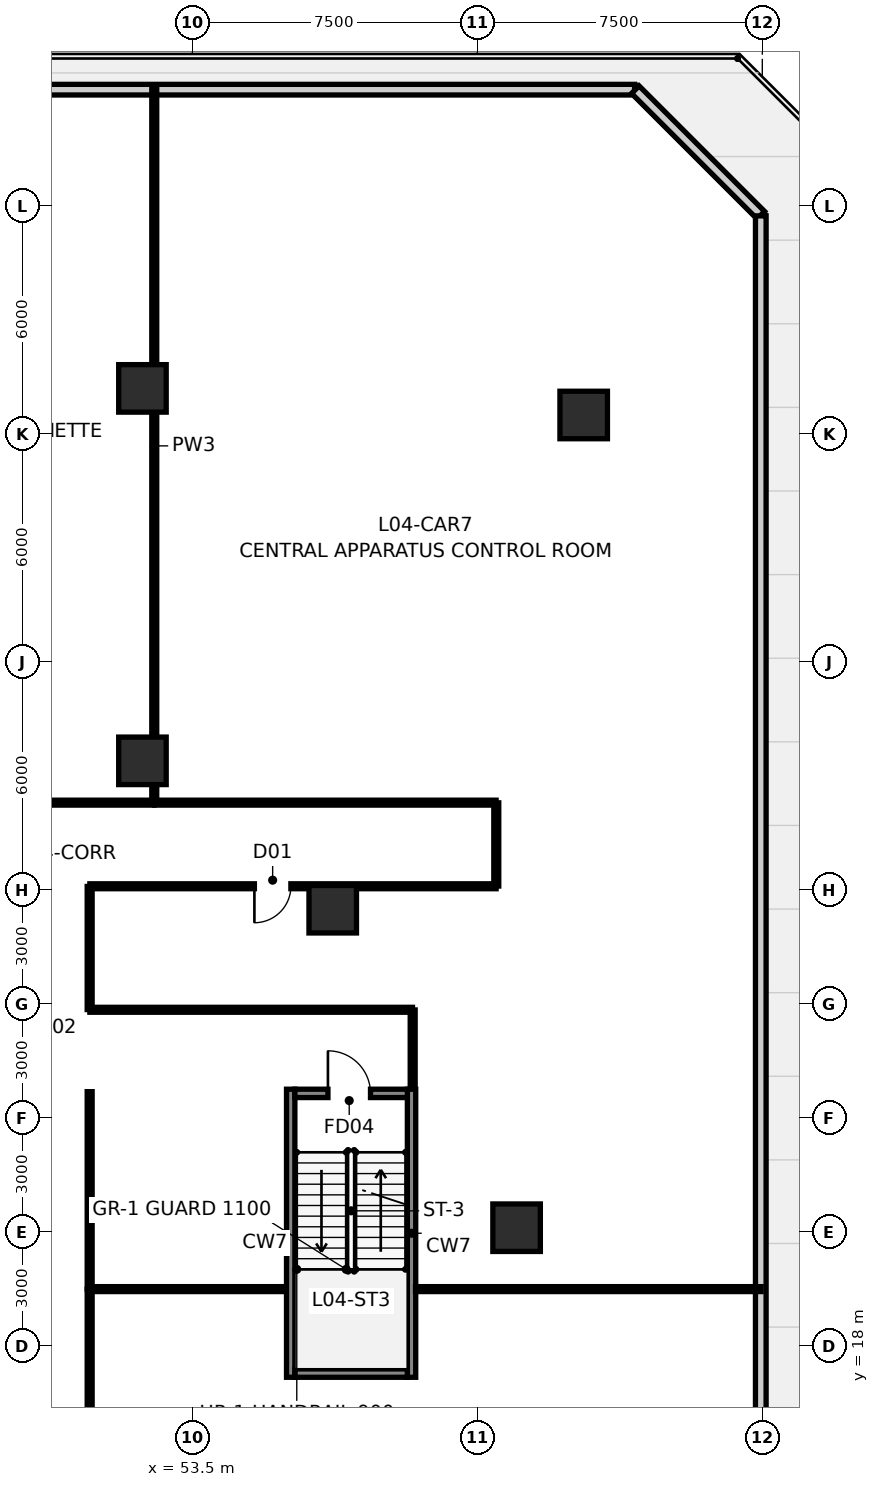
"""IFC4 building model, lengths in metres.
Left out: names, types, materials, properties, quantities, classifications, styles, units other than length and angle.
Written with IfcOpenShell. Run it as: python <this file> out.ifc"""

import sys

from ifc_helpers import new_model, si_unit, direction, frame, frame_2d, origin, origin_2d, place, context, subcontext, project, spatial, rectangle, hollow_rectangle, extrude, source, transform, mapped, element, fill, save


model = new_model("IFC4")
c1 = context("Model", 3, precision=1e-05, world=origin(), true_north=direction((0.0, 1.0)))
c2 = subcontext(c1, "Body", "Model", "MODEL_VIEW")
j1 = project(units=[si_unit("LENGTHUNIT", "METRE"), si_unit("PLANEANGLEUNIT", "RADIAN")], contexts=[c1])
p1 = place(None, origin())
s1 = spatial("IfcSite", under=j1, at=p1, CompositionType="ELEMENT")
p2 = place(p1, origin())
s2 = spatial("IfcBuilding", under=s1, at=p2, CompositionType="ELEMENT")
p3 = place(p2, frame((0.0, 0.0, 18.9)))
s3 = spatial("IfcBuildingStorey", under=s2, at=p3, CompositionType="ELEMENT", Elevation=18.9)
for number, where, z_axis, x_axis in (
    (1, (56.09, 17.18, 0.0), (0.0, 0.0, 1.0), (0.0, 1.0, 0.0)),
    (2, (59.27, 17.18, 0.0), (0.0, 0.0, 1.0), (0.0, 1.0, 0.0)),
):
    element("IfcWall", number, at=place(p3, frame(where, z_axis=z_axis, x_axis=x_axis)), inside=s3, PredefinedType="SHEAR", context=c2, shape_type="SweptSolid", body=[
        extrude(rectangle(XDim=7.58, YDim=0.22, at=frame_2d((3.79, 0.0))), origin(), (0.0, 0.0, 1.0), 4.2),
    ])
p4 = place(p3, frame((56.2, 17.29, 0.0), z_axis=(0.0, 0.0, 1.0), x_axis=(1.0, 0.0, 0.0)))
e3 = element("IfcWall", 3, at=p4, inside=s3, PredefinedType="SHEAR", context=c2, shape_type="SweptSolid", body=[
    extrude(rectangle(XDim=2.96, YDim=0.22, at=frame_2d((1.48, 0.0))), origin(), (0.0, 0.0, 1.0), 4.2),
])
p5 = place(p3, frame((56.2, 24.65, 0.0), z_axis=(0.0, 0.0, 1.0), x_axis=(1.0, 0.0, 0.0)))
e4 = element("IfcWall", 4, at=p5, inside=s3, PredefinedType="SHEAR", context=c2, shape_type="SweptSolid", body=[
    extrude(rectangle(XDim=2.96, YDim=0.22, at=frame_2d((1.48, 0.0))), origin(), (0.0, 0.0, 1.0), 4.2),
])
p6 = place(p5, frame((0.87, 0.0, 0.0)))
e5 = element("IfcOpeningElement", 5, at=p6, cuts=e4, PredefinedType="OPENING", context=c2, shape_type="SweptSolid", body=[
    extrude(rectangle(XDim=1.12, YDim=2.15, at=frame_2d((0.56, 1.075))), frame((0.0, 0.122, 0.0), z_axis=(0.0, -1.0, 0.0), x_axis=(1.0, 0.0, 0.0)), (0.0, 0.0, 1.0), 0.244),
])
m1 = source(origin(), c2, "Body", "SweptSolid", [
    extrude(hollow_rectangle(XDim=1.25, YDim=1.25, WallThickness=0.07, at=origin_2d()), origin(), (0.0, 0.0, 1.0), 4.201),
])
p7 = place(p3, frame((62.035, 21.115, 0.0), z_axis=(-0.010459692038, -0.021500478079, 0.999714121279), x_axis=(0.899235088746, -0.437465718849, 0.0)))
e6 = element("IfcColumn", 6, at=p7, inside=s3, PredefinedType="COLUMN", context=c2, shape_type="MappedRepresentation", body=[
    mapped(m1, transform((0.0, 0.0, 0.0), scale=1.0)),
])
m2 = source(origin(), c2, "Body", "SweptSolid", [
    extrude(hollow_rectangle(XDim=1.25, YDim=1.25, WallThickness=0.07, at=origin_2d()), origin(), (0.0, 0.0, 1.0), 4.201),
])
p8 = place(p3, frame((57.196, 29.496, 0.0), z_axis=(-0.014877190058, -0.013831137632, 0.999793663136), x_axis=(0.680889907137, -0.732385782467, 0.0)))
e7 = element("IfcColumn", 7, at=p8, inside=s3, PredefinedType="COLUMN", context=c2, shape_type="MappedRepresentation", body=[
    mapped(m2, transform((0.0, 0.0, 0.0), scale=1.0)),
])
m3 = source(origin(), c2, "Body", "SweptSolid", [
    extrude(hollow_rectangle(XDim=1.25, YDim=1.25, WallThickness=0.07, at=origin_2d()), origin(), (0.0, 0.0, 1.0), 4.2),
])
for number, where, z_axis, x_axis in (
    (8, (52.189, 33.4, 0.0), (0.0, 0.0, 1.0), (1.0, 0.0, 0.0)),
    (9, (52.189, 43.2, 0.0), (0.0, 0.0, 1.0), (1.0, 0.0, 0.0)),
    (10, (63.8, 42.5, 0.0), (0.0, 0.0, 1.0), (1.0, 0.0, 0.0)),
):
    element("IfcColumn", number, at=place(p3, frame(where, z_axis=z_axis, x_axis=x_axis)), inside=s3, PredefinedType="COLUMN", context=c2, shape_type="MappedRepresentation", body=[
        mapped(m3, transform((0.0, 0.0, 0.0), scale=1.0)),
    ])
p9 = place(p3, frame((10.861, 51.06, 0.0), z_axis=(0.0, 0.0, 1.0), x_axis=(1.0, 0.0, 0.0)))
e11 = element("IfcWall", 11, at=p9, inside=s3, PredefinedType="STANDARD", context=c2, shape_type="SweptSolid", body=[
    extrude(rectangle(XDim=54.278, YDim=0.28, at=frame_2d((27.139, 0.0))), origin(), (0.0, 0.0, 1.0), 3.75),
])
p10 = place(p3, frame((65.159, 51.06, 0.0), z_axis=(0.0, 0.0, 1.0), x_axis=(0.707106781187, -0.707106781187, 0.0)))
e12 = element("IfcWall", 12, at=p10, inside=s3, PredefinedType="STANDARD", context=c2, shape_type="SweptSolid", body=[
    extrude(rectangle(XDim=4.668, YDim=0.28, at=frame_2d((2.334, 0.0))), origin(), (0.0, 0.0, 1.0), 3.75),
])
p11 = place(p3, frame((68.46, 47.739, 0.0), z_axis=(0.0, 0.0, 1.0), x_axis=(0.0, -1.0, 0.0)))
e13 = element("IfcWall", 13, at=p11, inside=s3, PredefinedType="STANDARD", context=c2, shape_type="SweptSolid", body=[
    extrude(rectangle(XDim=41.678, YDim=0.28, at=frame_2d((20.839, 0.0))), origin(), (0.0, 0.0, 1.0), 3.75),
])
p12 = place(p3, frame((52.5, 32.305, 0.0), z_axis=(0.0, 0.0, 1.0), x_axis=(0.0, 1.0, 0.0)))
e14 = element("IfcWall", 14, at=p12, inside=s3, PredefinedType="PARTITIONING", context=c2, shape_type="SweptSolid", body=[
    extrude(rectangle(XDim=18.765, YDim=0.13, at=frame_2d((9.383, 0.0))), origin(), (0.0, 0.0, 1.0), 2.735),
])
p13 = place(p3, frame((61.495, 30.1, 0.0), z_axis=(0.0, 0.0, 1.0), x_axis=(-1.0, 0.0, 0.0)))
e15 = element("IfcWall", 15, at=p13, inside=s3, PredefinedType="PARTITIONING", context=c2, shape_type="SweptSolid", body=[
    extrude(rectangle(XDim=10.69, YDim=0.13, at=frame_2d((5.345, 0.0))), origin(), (0.0, 0.0, 1.0), 3.124),
])
p14 = place(p13, frame((5.4, 0.0, 0.0)))
e16 = element("IfcOpeningElement", 16, at=p14, cuts=e15, PredefinedType="OPENING", context=c2, shape_type="SweptSolid", body=[
    extrude(rectangle(XDim=0.96, YDim=2.15, at=frame_2d((0.48, 1.075))), frame((0.0, 0.077, 0.0), z_axis=(0.0, -1.0, 0.0), x_axis=(1.0, 0.0, 0.0)), (0.0, 0.0, 1.0), 0.154),
])
p15 = place(p3, frame((42.505, 32.3, 0.0), z_axis=(0.0, 0.0, 1.0), x_axis=(1.0, 0.0, 0.0)))
e17 = element("IfcWall", 17, at=p15, inside=s3, PredefinedType="PARTITIONING", context=c2, shape_type="SweptSolid", body=[
    extrude(rectangle(XDim=9.99, YDim=0.13, at=frame_2d((4.995, 0.0))), origin(), (0.0, 0.0, 1.0), 3.75),
])
p16 = place(p15, frame((4.515, 0.0, 0.0)))
e18 = element("IfcOpeningElement", 18, at=p16, cuts=e17, PredefinedType="OPENING", context=c2, shape_type="SweptSolid", body=[
    extrude(rectangle(XDim=0.96, YDim=2.15, at=frame_2d((0.48, 1.075))), frame((0.0, 0.077, 0.0), z_axis=(0.0, -1.0, 0.0), x_axis=(1.0, 0.0, 0.0)), (0.0, 0.0, 1.0), 0.154),
])
p17 = place(p3, frame((59.375, 19.5, 0.0), z_axis=(0.0, 0.0, 1.0), x_axis=(1.0, 0.0, 0.0)))
e19 = element("IfcWall", 19, at=p17, inside=s3, PredefinedType="PARTITIONING", context=c2, shape_type="SweptSolid", body=[
    extrude(rectangle(XDim=9.095, YDim=0.13, at=frame_2d((4.547, 0.0))), origin(), (0.0, 0.0, 1.0), 3.75),
])
p18 = place(p3, frame((52.505, 32.3, 0.0), z_axis=(0.0, 0.0, 1.0), x_axis=(1.0, 0.0, 0.0)))
e20 = element("IfcWall", 20, at=p18, inside=s3, PredefinedType="PARTITIONING", context=c2, shape_type="SweptSolid", body=[
    extrude(rectangle(XDim=8.99, YDim=0.13, at=frame_2d((4.495, 0.0))), origin(), (0.0, 0.0, 1.0), 3.75),
])
p19 = place(p3, frame((50.805, 26.85, 0.0), z_axis=(0.0, 0.0, 1.0), x_axis=(1.0, 0.0, 0.0)))
e21 = element("IfcWall", 21, at=p19, inside=s3, PredefinedType="PARTITIONING", context=c2, shape_type="SweptSolid", body=[
    extrude(rectangle(XDim=8.49, YDim=0.13, at=frame_2d((4.245, 0.0))), origin(), (0.0, 0.0, 1.0), 3.75),
])
p20 = place(p3, frame((50.8, 12.205, 0.0), z_axis=(0.0, 0.0, 1.0), x_axis=(0.0, 1.0, 0.0)))
e22 = element("IfcWall", 22, at=p20, inside=s3, PredefinedType="PARTITIONING", context=c2, shape_type="SweptSolid", body=[
    extrude(rectangle(XDim=7.29, YDim=0.13, at=frame_2d((3.645, 0.0))), origin(), (0.0, 0.0, 1.0), 3.75),
])
p21 = place(p20, frame((3.165, 0.0, 0.0)))
e23 = element("IfcOpeningElement", 23, at=p21, cuts=e22, PredefinedType="OPENING", context=c2, shape_type="SweptSolid", body=[
    extrude(rectangle(XDim=0.96, YDim=2.15, at=frame_2d((0.48, 1.075))), frame((0.0, 0.077, 0.0), z_axis=(0.0, -1.0, 0.0), x_axis=(1.0, 0.0, 0.0)), (0.0, 0.0, 1.0), 0.154),
])
p22 = place(p3, frame((50.805, 19.5, 0.0), z_axis=(0.0, 0.0, 1.0), x_axis=(1.0, 0.0, 0.0)))
e24 = element("IfcWall", 24, at=p22, inside=s3, PredefinedType="PARTITIONING", context=c2, shape_type="SweptSolid", body=[
    extrude(rectangle(XDim=5.17, YDim=0.13, at=frame_2d((2.585, 0.0))), origin(), (0.0, 0.0, 1.0), 3.75),
])
p23 = place(p3, frame((50.8, 24.695, 0.0), z_axis=(0.0, 0.0, 1.0), x_axis=(0.0, -1.0, 0.0)))
e25 = element("IfcWall", 25, at=p23, inside=s3, PredefinedType="PARTITIONING", context=c2, shape_type="SweptSolid", body=[
    extrude(rectangle(XDim=5.19, YDim=0.13, at=frame_2d((2.595, 0.0))), origin(), (0.0, 0.0, 1.0), 3.75),
])
p24 = place(p3, frame((50.8, 30.095, 0.0), z_axis=(0.0, 0.0, 1.0), x_axis=(0.0, -1.0, 0.0)))
e26 = element("IfcWall", 26, at=p24, inside=s3, PredefinedType="PARTITIONING", context=c2, shape_type="SweptSolid", body=[
    extrude(rectangle(XDim=3.24, YDim=0.13, at=frame_2d((1.62, 0.0))), origin(), (0.0, 0.0, 1.0), 3.75),
])
p25 = place(p3, frame((61.5, 32.295, 0.0), z_axis=(0.0, 0.0, 1.0), x_axis=(0.0, -1.0, 0.0)))
e27 = element("IfcWall", 27, at=p25, inside=s3, PredefinedType="PARTITIONING", context=c2, shape_type="SweptSolid", body=[
    extrude(rectangle(XDim=2.19, YDim=0.13, at=frame_2d((1.095, 0.0))), origin(), (0.0, 0.0, 1.0), 3.75),
])
p26 = place(p3, frame((59.3, 26.845, 0.0), z_axis=(0.0, 0.0, 1.0), x_axis=(0.0, -1.0, 0.0)))
e28 = element("IfcWall", 28, at=p26, inside=s3, PredefinedType="PARTITIONING", context=c2, shape_type="SweptSolid", body=[
    extrude(rectangle(XDim=2.07, YDim=0.13, at=frame_2d((1.035, 0.0))), origin(), (0.0, 0.0, 1.0), 3.75),
])
p27 = place(p6, origin())
e29 = element("IfcDoor", 29, at=p27, inside=s3, OperationType="SINGLE_SWING_LEFT", PredefinedType="DOOR", context=c2, shape_type="SweptSolid", body=[
    extrude(rectangle(XDim=1.12, YDim=2.15, at=frame_2d((0.56, 1.075))), frame((0.0, 0.025, 0.0), z_axis=(0.0, -1.0, 0.0), x_axis=(1.0, 0.0, 0.0)), (0.0, 0.0, 1.0), 0.05),
])
fill(e5, e29)
p28 = place(p14, origin())
e30 = element("IfcDoor", 30, at=p28, inside=s3, OperationType="SINGLE_SWING_RIGHT", PredefinedType="DOOR", context=c2, shape_type="SweptSolid", body=[
    extrude(rectangle(XDim=0.96, YDim=2.15, at=frame_2d((0.48, 1.075))), frame((0.0, 0.025, 0.0), z_axis=(0.0, -1.0, 0.0), x_axis=(1.0, 0.0, 0.0)), (0.0, 0.0, 1.0), 0.05),
])
fill(e16, e30)
save(model, sys.argv[1])
